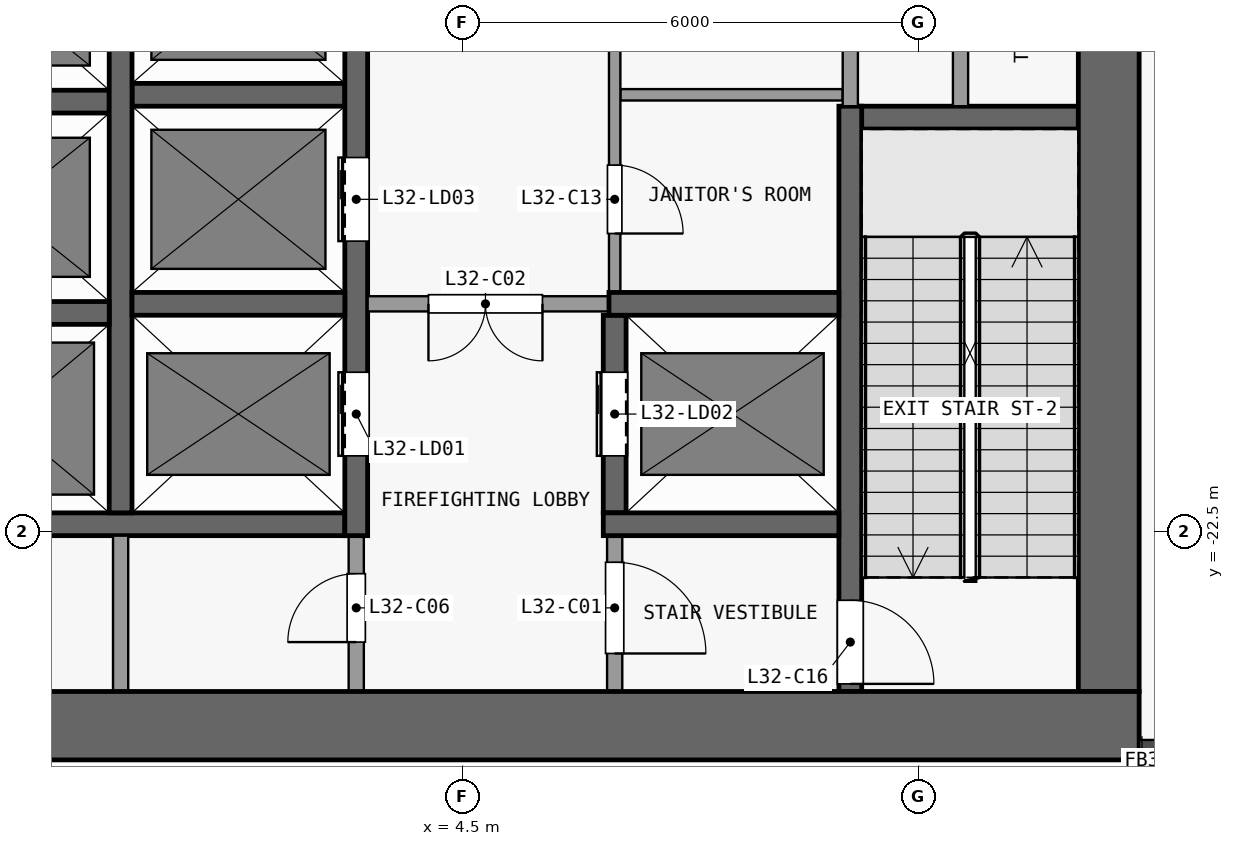
"""IFC4 building model, lengths in metres.
Left out: names, types, materials, properties, quantities, classifications, styles, units other than length and angle.
Written with IfcOpenShell. Run it as: python <this file> out.ifc"""

import sys

from ifc_helpers import new_model, si_unit, direction, frame, frame_2d, origin, place, context, subcontext, project, spatial, rectangle, extrude, element, fill, save


model = new_model("IFC4")
c1 = context("Model", 3, precision=1e-05, world=origin(), true_north=direction((0.0, 1.0)))
c2 = subcontext(c1, "Body", "Model", "MODEL_VIEW")
j1 = project(units=[si_unit("LENGTHUNIT", "METRE"), si_unit("PLANEANGLEUNIT", "RADIAN")], contexts=[c1])
p1 = place(None, origin())
s1 = spatial("IfcSite", under=j1, at=p1, CompositionType="ELEMENT")
p2 = place(p1, origin())
s2 = spatial("IfcBuilding", under=s1, at=p2, CompositionType="ELEMENT")
p3 = place(p2, frame((0.0, 0.0, 127.9)))
s3 = spatial("IfcBuildingStorey", under=s2, at=p3, CompositionType="ELEMENT", Elevation=127.9)
p4 = place(p3, frame((-13.4, -25.05, 0.0), z_axis=(0.0, 0.0, 1.0), x_axis=(1.0, 0.0, 0.0)))
e1 = element("IfcWall", 1, at=p4, inside=s3, PredefinedType="SHEAR", context=c2, shape_type="SweptSolid", body=[
    extrude(rectangle(XDim=26.8, YDim=0.9, at=frame_2d((13.4, 0.0))), origin(), (0.0, 0.0, 1.0), 5.7),
])
p5 = place(p3, frame((13.0, -24.6, 0.0), z_axis=(0.0, 0.0, 1.0), x_axis=(0.0, 1.0, 0.0)))
e2 = element("IfcWall", 2, at=p5, inside=s3, PredefinedType="SHEAR", context=c2, shape_type="SweptSolid", body=[
    extrude(rectangle(XDim=16.1, YDim=0.8, at=frame_2d((8.05, 0.0))), origin(), (0.0, 0.0, 1.0), 5.7),
])
p6 = place(p3, frame((-2.95, -22.4, 0.0), z_axis=(0.0, 0.0, 1.0), x_axis=(1.0, 0.0, 0.0)))
e3 = element("IfcWall", 3, at=p6, inside=s3, PredefinedType="SHEAR", context=c2, shape_type="SweptSolid", body=[
    extrude(rectangle(XDim=5.9, YDim=0.3, at=frame_2d((2.95, 0.0))), origin(), (0.0, 0.0, 1.0), 5.7),
])
p7 = place(p3, frame((6.35, -22.4, 0.0), z_axis=(0.0, 0.0, 1.0), x_axis=(1.0, 0.0, 0.0)))
e4 = element("IfcWall", 4, at=p7, inside=s3, PredefinedType="SHEAR", context=c2, shape_type="SweptSolid", body=[
    extrude(rectangle(XDim=3.1, YDim=0.3, at=frame_2d((1.55, 0.0))), origin(), (0.0, 0.0, 1.0), 5.7),
])
for number, where, z_axis, x_axis in (
    (5, (-2.95, -19.62, 0.0), (0.0, 0.0, 1.0), (1.0, 0.0, 0.0)),
    (6, (0.15, -19.5, 0.0), (0.0, 0.0, 1.0), (1.0, 0.0, 0.0)),
):
    element("IfcWall", number, at=place(p3, frame(where, z_axis=z_axis, x_axis=x_axis)), inside=s3, PredefinedType="SHEAR", context=c2, shape_type="SweptSolid", body=[
        extrude(rectangle(XDim=2.8, YDim=0.3, at=frame_2d((1.4, 0.0))), origin(), (0.0, 0.0, 1.0), 5.7),
    ])
p8 = place(p3, frame((6.575, -19.5, 0.0), z_axis=(0.0, 0.0, 1.0), x_axis=(-1.0, 0.0, 0.0)))
e7 = element("IfcWall", 7, at=p8, inside=s3, PredefinedType="PARTITIONING", context=c2, shape_type="SweptSolid", body=[
    extrude(rectangle(XDim=3.325, YDim=0.2, at=frame_2d((1.663, 0.0))), origin(), (0.0, 0.0, 1.0), 5.7),
])
p9 = place(p8, frame((1.025, 0.0, 0.0)))
e8 = element("IfcOpeningElement", 8, at=p9, cuts=e7, PredefinedType="OPENING", context=c2, shape_type="SweptSolid", body=[
    extrude(rectangle(XDim=1.5, YDim=2.1, at=frame_2d((0.75, 1.05))), frame((0.0, 0.11, 0.0), z_axis=(0.0, -1.0, 0.0), x_axis=(1.0, 0.0, 0.0)), (0.0, 0.0, 1.0), 0.22),
])
p10 = place(p3, frame((6.425, -19.5, 0.0), z_axis=(0.0, 0.0, 1.0), x_axis=(1.0, 0.0, 0.0)))
e9 = element("IfcWall", 9, at=p10, inside=s3, PredefinedType="SHEAR", context=c2, shape_type="SweptSolid", body=[
    extrude(rectangle(XDim=3.025, YDim=0.3, at=frame_2d((1.512, 0.0))), origin(), (0.0, 0.0, 1.0), 5.7),
])
p11 = place(p3, frame((9.5, -17.05, 0.0), z_axis=(0.0, 0.0, 1.0), x_axis=(1.0, 0.0, 0.0)))
e10 = element("IfcWall", 10, at=p11, inside=s3, PredefinedType="SHEAR", context=c2, shape_type="SweptSolid", body=[
    extrude(rectangle(XDim=3.1, YDim=0.3, at=frame_2d((1.55, 0.0))), origin(), (0.0, 0.0, 1.0), 5.7),
])
for number, where, z_axis, x_axis in (
    (11, (-2.95, -16.84, 0.0), (0.0, 0.0, 1.0), (1.0, 0.0, 0.0)),
    (12, (0.15, -16.75, 0.0), (0.0, 0.0, 1.0), (1.0, 0.0, 0.0)),
):
    element("IfcWall", number, at=place(p3, frame(where, z_axis=z_axis, x_axis=x_axis)), inside=s3, PredefinedType="SHEAR", context=c2, shape_type="SweptSolid", body=[
        extrude(rectangle(XDim=2.8, YDim=0.3, at=frame_2d((1.4, 0.0))), origin(), (0.0, 0.0, 1.0), 5.7),
    ])
p12 = place(p3, frame((6.575, -16.75, 0.0), z_axis=(0.0, 0.0, 1.0), x_axis=(1.0, 0.0, 0.0)))
e13 = element("IfcWall", 13, at=p12, inside=s3, PredefinedType="PARTITIONING", context=c2, shape_type="SweptSolid", body=[
    extrude(rectangle(XDim=2.925, YDim=0.15, at=frame_2d((1.462, 0.0))), origin(), (0.0, 0.0, 1.0), 5.7),
])
p13 = place(p3, frame((0.0, -24.6, 0.0), z_axis=(0.0, 0.0, 1.0), x_axis=(0.0, 1.0, 0.0)))
e14 = element("IfcWall", 14, at=p13, inside=s3, PredefinedType="PARTITIONING", context=c2, shape_type="SweptSolid", body=[
    extrude(rectangle(XDim=2.05, YDim=0.2, at=frame_2d((1.025, 0.0))), origin(), (0.0, 0.0, 1.0), 5.7),
])
p14 = place(p3, frame((0.0, -22.25, 0.0), z_axis=(0.0, 0.0, 1.0), x_axis=(0.0, 1.0, 0.0)))
e15 = element("IfcWall", 15, at=p14, inside=s3, PredefinedType="SHEAR", context=c2, shape_type="SweptSolid", body=[
    extrude(rectangle(XDim=13.75, YDim=0.3, at=frame_2d((6.875, 0.0))), origin(), (0.0, 0.0, 1.0), 5.7),
])
p15 = place(p3, frame((3.1, -24.6, 0.0), z_axis=(0.0, 0.0, 1.0), x_axis=(0.0, 1.0, 0.0)))
e16 = element("IfcWall", 16, at=p15, inside=s3, PredefinedType="PARTITIONING", context=c2, shape_type="SweptSolid", body=[
    extrude(rectangle(XDim=2.05, YDim=0.2, at=frame_2d((1.025, 0.0))), origin(), (0.0, 0.0, 1.0), 5.7),
])
p16 = place(p15, frame((0.65, 0.0, 0.0)))
e17 = element("IfcOpeningElement", 17, at=p16, cuts=e16, PredefinedType="OPENING", context=c2, shape_type="SweptSolid", body=[
    extrude(rectangle(XDim=0.9, YDim=2.1, at=frame_2d((0.45, 1.05))), frame((0.0, 0.11, 0.0), z_axis=(0.0, -1.0, 0.0), x_axis=(1.0, 0.0, 0.0)), (0.0, 0.0, 1.0), 0.22),
])
p17 = place(p3, frame((3.1, -22.55, 0.0), z_axis=(0.0, 0.0, 1.0), x_axis=(0.0, 1.0, 0.0)))
e18 = element("IfcWall", 18, at=p17, inside=s3, PredefinedType="SHEAR", context=c2, shape_type="SweptSolid", body=[
    extrude(rectangle(XDim=14.05, YDim=0.3, at=frame_2d((7.025, 0.0))), origin(), (0.0, 0.0, 1.0), 5.7),
])
p18 = place(p17, frame((1.05, 0.0, 0.0)))
e19 = element("IfcOpeningElement", 19, at=p18, cuts=e18, PredefinedType="OPENING", context=c2, shape_type="SweptSolid", body=[
    extrude(rectangle(XDim=1.1, YDim=2.1, at=frame_2d((0.55, 1.05))), frame((0.0, 0.16, 0.0), z_axis=(0.0, -1.0, 0.0), x_axis=(1.0, 0.0, 0.0)), (0.0, 0.0, 1.0), 0.32),
])
p19 = place(p17, frame((3.875, 0.0, 0.0)))
e20 = element("IfcOpeningElement", 20, at=p19, cuts=e18, PredefinedType="OPENING", context=c2, shape_type="SweptSolid", body=[
    extrude(rectangle(XDim=1.1, YDim=2.1, at=frame_2d((0.55, 1.05))), frame((0.0, 0.16, 0.0), z_axis=(0.0, -1.0, 0.0), x_axis=(1.0, 0.0, 0.0)), (0.0, 0.0, 1.0), 0.32),
])
p20 = place(p17, frame((6.625, 0.0, 0.0)))
e21 = element("IfcOpeningElement", 21, at=p20, cuts=e18, PredefinedType="OPENING", context=c2, shape_type="SweptSolid", body=[
    extrude(rectangle(XDim=1.1, YDim=2.1, at=frame_2d((0.55, 1.05))), frame((0.0, 0.16, 0.0), z_axis=(0.0, -1.0, 0.0), x_axis=(1.0, 0.0, 0.0)), (0.0, 0.0, 1.0), 0.32),
])
p21 = place(p17, frame((9.375, 0.0, 0.0)))
e22 = element("IfcOpeningElement", 22, at=p21, cuts=e18, PredefinedType="OPENING", context=c2, shape_type="SweptSolid", body=[
    extrude(rectangle(XDim=1.1, YDim=2.1, at=frame_2d((0.55, 1.05))), frame((0.0, 0.16, 0.0), z_axis=(0.0, -1.0, 0.0), x_axis=(1.0, 0.0, 0.0)), (0.0, 0.0, 1.0), 0.32),
])
p22 = place(p17, frame((12.125, 0.0, 0.0)))
e23 = element("IfcOpeningElement", 23, at=p22, cuts=e18, PredefinedType="OPENING", context=c2, shape_type="SweptSolid", body=[
    extrude(rectangle(XDim=1.1, YDim=2.1, at=frame_2d((0.55, 1.05))), frame((0.0, 0.16, 0.0), z_axis=(0.0, -1.0, 0.0), x_axis=(1.0, 0.0, 0.0)), (0.0, 0.0, 1.0), 0.32),
])
p23 = place(p3, frame((6.5, -22.55, 0.0), z_axis=(0.0, 0.0, 1.0), x_axis=(0.0, -1.0, 0.0)))
e24 = element("IfcWall", 24, at=p23, inside=s3, PredefinedType="PARTITIONING", context=c2, shape_type="SweptSolid", body=[
    extrude(rectangle(XDim=2.05, YDim=0.2, at=frame_2d((1.025, 0.0))), origin(), (0.0, 0.0, 1.0), 5.7),
])
p24 = place(p23, frame((0.35, 0.0, 0.0)))
e25 = element("IfcOpeningElement", 25, at=p24, cuts=e24, PredefinedType="OPENING", context=c2, shape_type="SweptSolid", body=[
    extrude(rectangle(XDim=1.2, YDim=2.1, at=frame_2d((0.6, 1.05))), frame((0.0, 0.11, 0.0), z_axis=(0.0, -1.0, 0.0), x_axis=(1.0, 0.0, 0.0)), (0.0, 0.0, 1.0), 0.22),
])
p25 = place(p3, frame((6.5, -22.25, 0.0), z_axis=(0.0, 0.0, 1.0), x_axis=(0.0, 1.0, 0.0)))
e26 = element("IfcWall", 26, at=p25, inside=s3, PredefinedType="SHEAR", context=c2, shape_type="SweptSolid", body=[
    extrude(rectangle(XDim=2.6, YDim=0.3, at=frame_2d((1.3, 0.0))), origin(), (0.0, 0.0, 1.0), 5.7),
])
p26 = place(p25, frame((0.75, 0.0, 0.0)))
e27 = element("IfcOpeningElement", 27, at=p26, cuts=e26, PredefinedType="OPENING", context=c2, shape_type="SweptSolid", body=[
    extrude(rectangle(XDim=1.1, YDim=2.1, at=frame_2d((0.55, 1.05))), frame((0.0, 0.16, 0.0), z_axis=(0.0, -1.0, 0.0), x_axis=(1.0, 0.0, 0.0)), (0.0, 0.0, 1.0), 0.32),
])
p27 = place(p3, frame((6.5, -8.5, 0.0), z_axis=(0.0, 0.0, 1.0), x_axis=(0.0, -1.0, 0.0)))
e28 = element("IfcWall", 28, at=p27, inside=s3, PredefinedType="PARTITIONING", context=c2, shape_type="SweptSolid", body=[
    extrude(rectangle(XDim=10.85, YDim=0.15, at=frame_2d((5.425, 0.0))), origin(), (0.0, 0.0, 1.0), 5.7),
])
p28 = place(p27, frame((9.175, 0.0, 0.0)))
e29 = element("IfcOpeningElement", 29, at=p28, cuts=e28, PredefinedType="OPENING", context=c2, shape_type="SweptSolid", body=[
    extrude(rectangle(XDim=0.9, YDim=2.1, at=frame_2d((0.45, 1.05))), frame((0.0, 0.085, 0.0), z_axis=(0.0, -1.0, 0.0), x_axis=(1.0, 0.0, 0.0)), (0.0, 0.0, 1.0), 0.17),
])
p29 = place(p27, frame((3.525, 0.0, 0.0)))
e30 = element("IfcOpeningElement", 30, at=p29, cuts=e28, PredefinedType="OPENING", context=c2, shape_type="SweptSolid", body=[
    extrude(rectangle(XDim=1.2, YDim=2.1, at=frame_2d((0.6, 1.05))), frame((0.0, 0.085, 0.0), z_axis=(0.0, -1.0, 0.0), x_axis=(1.0, 0.0, 0.0)), (0.0, 0.0, 1.0), 0.17),
])
p30 = place(p3, frame((9.6, -16.9, 0.0), z_axis=(0.0, 0.0, 1.0), x_axis=(0.0, -1.0, 0.0)))
e31 = element("IfcWall", 31, at=p30, inside=s3, PredefinedType="SHEAR", context=c2, shape_type="SweptSolid", body=[
    extrude(rectangle(XDim=7.7, YDim=0.3, at=frame_2d((3.85, 0.0))), origin(), (0.0, 0.0, 1.0), 5.7),
])
p31 = place(p30, frame((6.5, 0.0, 0.0)))
e32 = element("IfcOpeningElement", 32, at=p31, cuts=e31, PredefinedType="OPENING", context=c2, shape_type="SweptSolid", body=[
    extrude(rectangle(XDim=1.1, YDim=2.1, at=frame_2d((0.55, 1.05))), frame((0.0, 0.16, 0.0), z_axis=(0.0, -1.0, 0.0), x_axis=(1.0, 0.0, 0.0)), (0.0, 0.0, 1.0), 0.32),
])
p32 = place(p3, frame((9.6, -16.9, 0.0), z_axis=(0.0, 0.0, 1.0), x_axis=(0.0, 1.0, 0.0)))
e33 = element("IfcWall", 33, at=p32, inside=s3, PredefinedType="PARTITIONING", context=c2, shape_type="SweptSolid", body=[
    extrude(rectangle(XDim=8.4, YDim=0.2, at=frame_2d((4.2, 0.0))), origin(), (0.0, 0.0, 1.0), 5.7),
])
p33 = place(p3, frame((11.05, -11.9, 0.0), z_axis=(0.0, 0.0, 1.0), x_axis=(0.0, -1.0, 0.0)))
e34 = element("IfcWall", 34, at=p33, inside=s3, PredefinedType="PARTITIONING", context=c2, shape_type="SweptSolid", body=[
    extrude(rectangle(XDim=5.0, YDim=0.2, at=frame_2d((2.5, 0.0))), origin(), (0.0, 0.0, 1.0), 5.7),
])
p34 = place(p33, frame((2.175, 0.0, 0.0)))
e35 = element("IfcOpeningElement", 35, at=p34, cuts=e34, PredefinedType="OPENING", context=c2, shape_type="SweptSolid", body=[
    extrude(rectangle(XDim=0.9, YDim=2.1, at=frame_2d((0.45, 1.05))), frame((0.0, 0.11, 0.0), z_axis=(0.0, -1.0, 0.0), x_axis=(1.0, 0.0, 0.0)), (0.0, 0.0, 1.0), 0.22),
])
p35 = place(p18, origin())
e36 = element("IfcDoor", 36, at=p35, inside=s3, OperationType="DOUBLE_DOOR_SLIDING", PredefinedType="DOOR", context=c2, shape_type="SweptSolid", body=[
    extrude(rectangle(XDim=1.1, YDim=2.1, at=frame_2d((0.55, 1.05))), frame((0.0, 0.025, 0.0), z_axis=(0.0, -1.0, 0.0), x_axis=(1.0, 0.0, 0.0)), (0.0, 0.0, 1.0), 0.05),
])
fill(e19, e36)
p36 = place(p26, origin())
e37 = element("IfcDoor", 37, at=p36, inside=s3, OperationType="DOUBLE_DOOR_SLIDING", PredefinedType="DOOR", context=c2, shape_type="SweptSolid", body=[
    extrude(rectangle(XDim=1.1, YDim=2.1, at=frame_2d((0.55, 1.05))), frame((0.0, 0.025, 0.0), z_axis=(0.0, -1.0, 0.0), x_axis=(1.0, 0.0, 0.0)), (0.0, 0.0, 1.0), 0.05),
])
fill(e27, e37)
p37 = place(p19, origin())
e38 = element("IfcDoor", 38, at=p37, inside=s3, OperationType="DOUBLE_DOOR_SLIDING", PredefinedType="DOOR", context=c2, shape_type="SweptSolid", body=[
    extrude(rectangle(XDim=1.1, YDim=2.1, at=frame_2d((0.55, 1.05))), frame((0.0, 0.025, 0.0), z_axis=(0.0, -1.0, 0.0), x_axis=(1.0, 0.0, 0.0)), (0.0, 0.0, 1.0), 0.05),
])
fill(e20, e38)
p38 = place(p24, origin())
e39 = element("IfcDoor", 39, at=p38, inside=s3, OperationType="SINGLE_SWING_RIGHT", PredefinedType="DOOR", context=c2, shape_type="SweptSolid", body=[
    extrude(rectangle(XDim=1.2, YDim=2.1, at=frame_2d((0.6, 1.05))), frame((0.0, 0.025, 0.0), z_axis=(0.0, -1.0, 0.0), x_axis=(1.0, 0.0, 0.0)), (0.0, 0.0, 1.0), 0.05),
])
fill(e25, e39)
p39 = place(p9, origin())
e40 = element("IfcDoor", 40, at=p39, inside=s3, OperationType="DOUBLE_DOOR_SINGLE_SWING", PredefinedType="DOOR", context=c2, shape_type="SweptSolid", body=[
    extrude(rectangle(XDim=1.5, YDim=2.1, at=frame_2d((0.75, 1.05))), frame((0.0, 0.025, 0.0), z_axis=(0.0, -1.0, 0.0), x_axis=(1.0, 0.0, 0.0)), (0.0, 0.0, 1.0), 0.05),
])
fill(e8, e40)
p40 = place(p16, origin())
e41 = element("IfcDoor", 41, at=p40, inside=s3, OperationType="SINGLE_SWING_LEFT", PredefinedType="DOOR", context=c2, shape_type="SweptSolid", body=[
    extrude(rectangle(XDim=0.9, YDim=2.1, at=frame_2d((0.45, 1.05))), frame((0.0, 0.025, 0.0), z_axis=(0.0, -1.0, 0.0), x_axis=(1.0, 0.0, 0.0)), (0.0, 0.0, 1.0), 0.05),
])
fill(e17, e41)
p41 = place(p28, origin())
e42 = element("IfcDoor", 42, at=p41, inside=s3, OperationType="SINGLE_SWING_RIGHT", PredefinedType="DOOR", context=c2, shape_type="SweptSolid", body=[
    extrude(rectangle(XDim=0.9, YDim=2.1, at=frame_2d((0.45, 1.05))), frame((0.0, 0.025, 0.0), z_axis=(0.0, -1.0, 0.0), x_axis=(1.0, 0.0, 0.0)), (0.0, 0.0, 1.0), 0.05),
])
fill(e29, e42)
p42 = place(p31, origin())
e43 = element("IfcDoor", 43, at=p42, inside=s3, OperationType="SINGLE_SWING_RIGHT", PredefinedType="DOOR", context=c2, shape_type="SweptSolid", body=[
    extrude(rectangle(XDim=1.1, YDim=2.1, at=frame_2d((0.55, 1.05))), frame((0.0, 0.025, 0.0), z_axis=(0.0, -1.0, 0.0), x_axis=(1.0, 0.0, 0.0)), (0.0, 0.0, 1.0), 0.05),
])
fill(e32, e43)
save(model, sys.argv[1])
